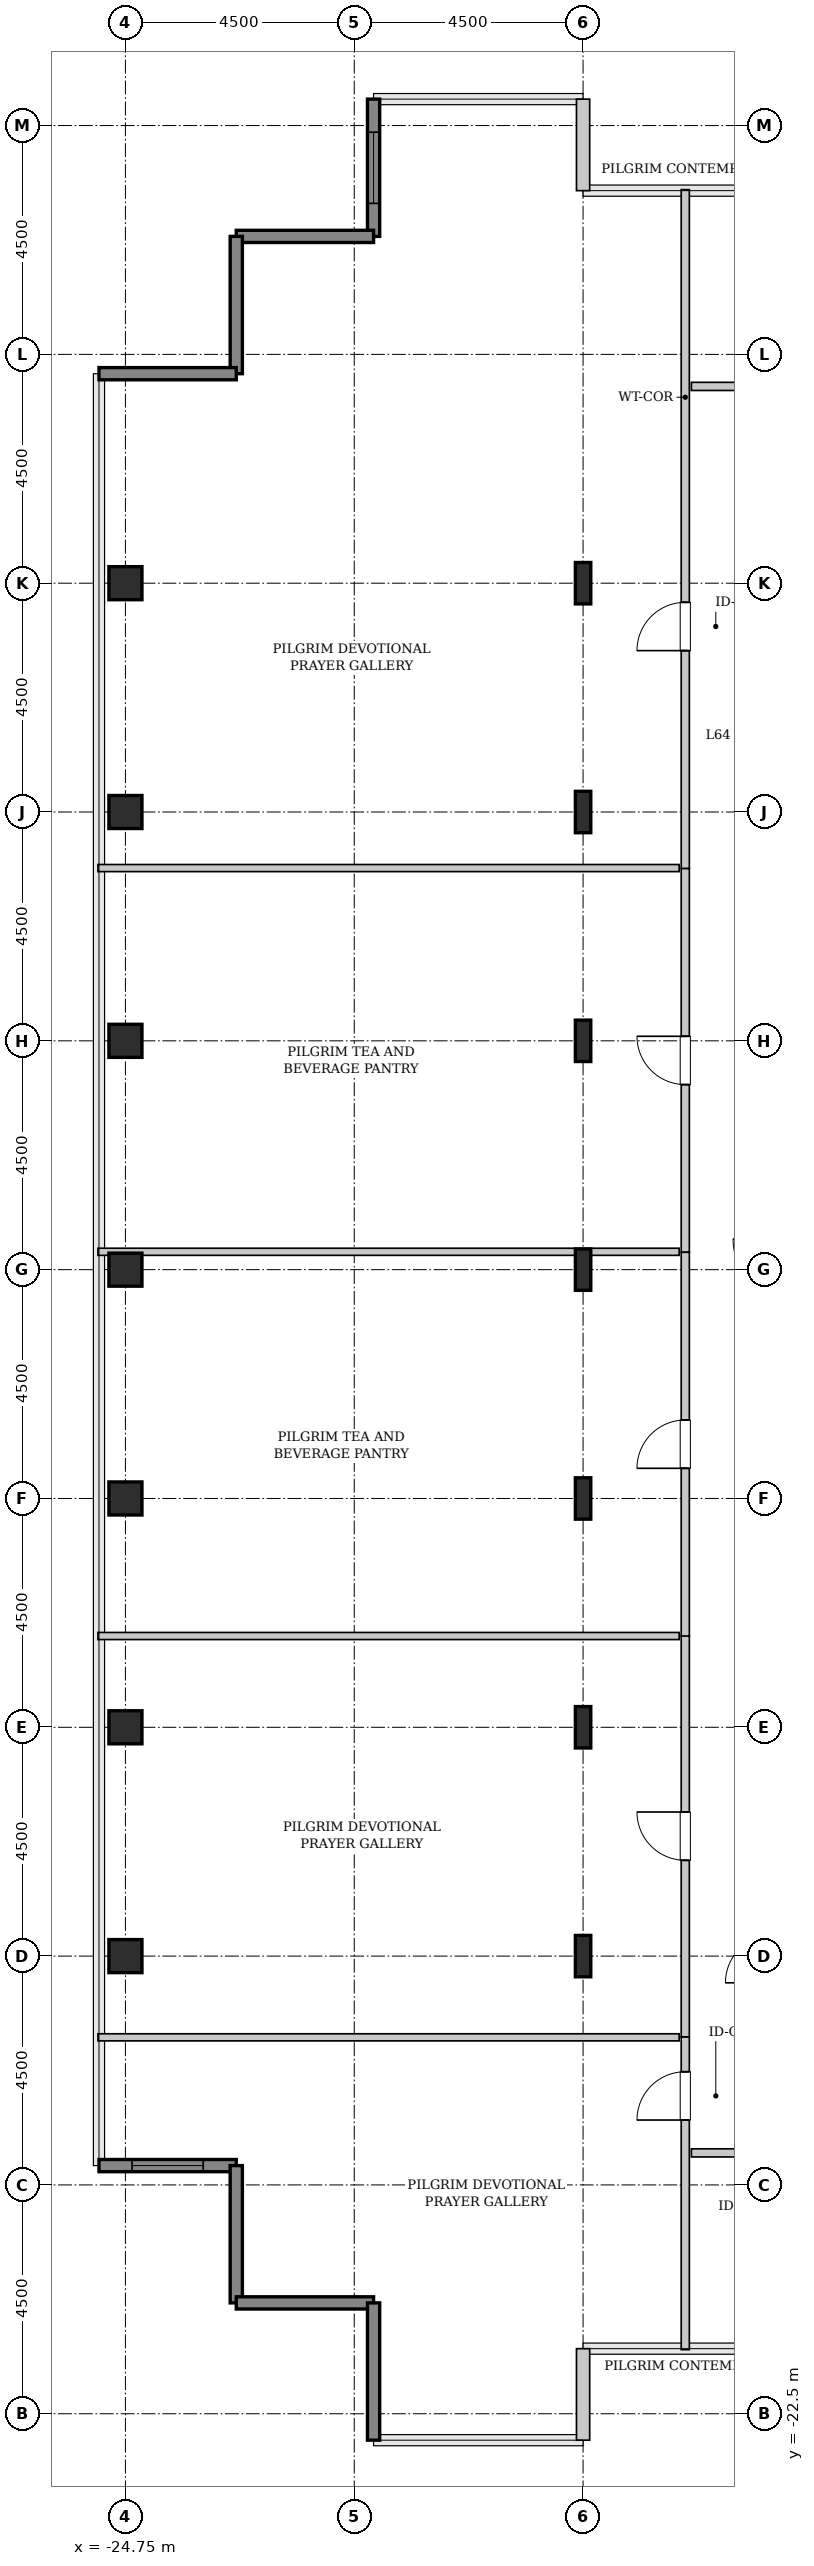
"""IFC4 building model, lengths in metres.
Left out: names, types, materials, properties, quantities, classifications, styles, units other than length and angle.
Written with IfcOpenShell. Run it as: python <this file> out.ifc"""

import sys

from ifc_helpers import new_model, si_unit, direction, frame, frame_2d, origin, origin_2d, place, context, subcontext, project, spatial, rectangle, hollow_rectangle, i_section, extrude, source, transform, mapped, element, fill, save


model = new_model("IFC4")
c1 = context("Model", 3, precision=1e-05, world=origin(), true_north=direction((0.0, 1.0)))
c2 = subcontext(c1, "Body", "Model", "MODEL_VIEW")
j1 = project(units=[si_unit("LENGTHUNIT", "METRE"), si_unit("PLANEANGLEUNIT", "RADIAN")], contexts=[c1])
p1 = place(None, origin())
s1 = spatial("IfcSite", under=j1, at=p1, CompositionType="ELEMENT")
p2 = place(p1, origin())
s2 = spatial("IfcBuilding", under=s1, at=p2, CompositionType="ELEMENT")
p3 = place(p2, frame((0.0, 0.0, 256.0)))
s3 = spatial("IfcBuildingStorey", under=s2, at=p3, CompositionType="ELEMENT", Elevation=256.0)
m1 = source(origin(), c2, "Body", "SweptSolid", [
    extrude(hollow_rectangle(XDim=0.65, YDim=0.65, WallThickness=0.032, InnerFilletRadius=0.032, OuterFilletRadius=0.064, at=origin_2d()), origin(), (0.0, 0.0, 1.0), 3.8),
])
for number, where, z_axis, x_axis in (
    (1, (-24.75, -13.5, 0.0), (0.0, 0.0, 1.0), (1.0, 0.0, 0.0)),
    (2, (-24.75, -9.0, 0.0), (0.0, 0.0, 1.0), (1.0, 0.0, 0.0)),
    (3, (-24.75, -4.5, 0.0), (0.0, 0.0, 1.0), (1.0, 0.0, 0.0)),
    (4, (-24.75, 0.0, 0.0), (0.0, 0.0, 1.0), (1.0, 0.0, 0.0)),
    (5, (-24.75, 4.5, 0.0), (0.0, 0.0, 1.0), (1.0, 0.0, 0.0)),
    (6, (-24.75, 9.0, 0.0), (0.0, 0.0, 1.0), (1.0, 0.0, 0.0)),
    (7, (-24.75, 13.5, 0.0), (0.0, 0.0, 1.0), (1.0, 0.0, 0.0)),
):
    element("IfcColumn", number, at=place(p3, frame(where, z_axis=z_axis, x_axis=x_axis)), inside=s3, PredefinedType="COLUMN", context=c2, shape_type="MappedRepresentation", body=[
        mapped(m1, transform((0.0, 0.0, 0.0), x_axis=(1.0, 0.0, 0.0), y_axis=(0.0, 1.0, 0.0), z_axis=(0.0, 0.0, 1.0), scale=1.0)),
    ])
m2 = source(origin(), c2, "Body", "SweptSolid", [
    extrude(i_section(OverallWidth=0.303, OverallDepth=0.814, WebThickness=0.021, FlangeThickness=0.04, FilletRadius=0.03, at=origin_2d()), origin(), (0.0, 0.0, 1.0), 3.8),
])
for number, where, z_axis, x_axis in (
    (8, (-15.75, -13.5, 0.0), (0.0, 0.0, 1.0), (1.0, 0.0, 0.0)),
    (9, (-15.75, -9.0, 0.0), (0.0, 0.0, 1.0), (1.0, 0.0, 0.0)),
    (10, (-15.75, -4.5, 0.0), (0.0, 0.0, 1.0), (1.0, 0.0, 0.0)),
    (11, (-15.75, 0.0, 0.0), (0.0, 0.0, 1.0), (1.0, 0.0, 0.0)),
    (12, (-15.75, 4.5, 0.0), (0.0, 0.0, 1.0), (1.0, 0.0, 0.0)),
    (13, (-15.75, 9.0, 0.0), (0.0, 0.0, 1.0), (1.0, 0.0, 0.0)),
    (14, (-15.75, 13.5, 0.0), (0.0, 0.0, 1.0), (1.0, 0.0, 0.0)),
):
    element("IfcColumn", number, at=place(p3, frame(where, z_axis=z_axis, x_axis=x_axis)), inside=s3, PredefinedType="COLUMN", context=c2, shape_type="MappedRepresentation", body=[
        mapped(m2, transform((0.0, 0.0, 0.0), x_axis=(1.0, 0.0, 0.0), y_axis=(0.0, 1.0, 0.0), z_axis=(0.0, 0.0, 1.0), scale=1.0)),
    ])
m3 = source(origin(), c2, "Body", "SweptSolid", [
    extrude(rectangle(XDim=1.8, YDim=0.26, at=frame_2d((0.9, 0.0))), origin(), (0.0, 0.0, 1.0), 3.5),
])
p4 = place(p3, frame((-15.75, 21.22, 0.0), z_axis=(0.0, 0.0, 1.0), x_axis=(0.0, 1.0, 0.0)))
e15 = element("IfcWall", 15, at=p4, inside=s3, PredefinedType="SOLIDWALL", context=c2, shape_type="MappedRepresentation", body=[
    mapped(m3, transform((0.0, 0.0, 0.0), x_axis=(1.0, 0.0, 0.0), y_axis=(0.0, 1.0, 0.0), z_axis=(0.0, 0.0, 1.0), scale=1.0)),
])
m4 = source(origin(), c2, "Body", "SweptSolid", [
    extrude(rectangle(XDim=2.7, YDim=0.24, at=frame_2d((1.35, 0.0))), origin(), (0.0, 0.0, 1.0), 3.5),
])
p5 = place(p3, frame((-19.87, 23.02, 0.0), z_axis=(0.0, 0.0, 1.0), x_axis=(0.0, -1.0, 0.0)))
e16 = element("IfcWall", 16, at=p5, inside=s3, PredefinedType="SHEAR", context=c2, shape_type="MappedRepresentation", body=[
    mapped(m4, transform((0.0, 0.0, 0.0), x_axis=(1.0, 0.0, 0.0), y_axis=(0.0, 1.0, 0.0), z_axis=(0.0, 0.0, 1.0), scale=1.0)),
])
p6 = place(p5, frame((0.65, 0.0, 0.85)))
e17 = element("IfcOpeningElement", 17, at=p6, cuts=e16, PredefinedType="OPENING", context=c2, shape_type="SweptSolid", body=[
    extrude(rectangle(XDim=1.4, YDim=1.8, at=frame_2d((0.7, 0.9))), frame((0.0, 0.13, 0.0), z_axis=(0.0, -1.0, 0.0), x_axis=(1.0, 0.0, 0.0)), (0.0, 0.0, 1.0), 0.26),
])
for number, where, z_axis, x_axis in (
    (18, (-19.87, 20.32, 0.0), (0.0, 0.0, 1.0), (-1.0, 0.0, 0.0)),
    (19, (-22.57, 20.32, 0.0), (0.0, 0.0, 1.0), (0.0, -1.0, 0.0)),
    (20, (-22.57, 17.62, 0.0), (0.0, 0.0, 1.0), (-1.0, 0.0, 0.0)),
):
    element("IfcWall", number, at=place(p3, frame(where, z_axis=z_axis, x_axis=x_axis)), inside=s3, PredefinedType="SHEAR", context=c2, shape_type="MappedRepresentation", body=[
        mapped(m4, transform((0.0, 0.0, 0.0), x_axis=(1.0, 0.0, 0.0), y_axis=(0.0, 1.0, 0.0), z_axis=(0.0, 0.0, 1.0), scale=1.0)),
    ])
p7 = place(p3, frame((-25.27, -17.62, 0.0), z_axis=(0.0, 0.0, 1.0), x_axis=(1.0, 0.0, 0.0)))
e21 = element("IfcWall", 21, at=p7, inside=s3, PredefinedType="SHEAR", context=c2, shape_type="MappedRepresentation", body=[
    mapped(m4, transform((0.0, 0.0, 0.0), x_axis=(1.0, 0.0, 0.0), y_axis=(0.0, 1.0, 0.0), z_axis=(0.0, 0.0, 1.0), scale=1.0)),
])
p8 = place(p7, frame((0.65, 0.0, 0.85)))
e22 = element("IfcOpeningElement", 22, at=p8, cuts=e21, PredefinedType="OPENING", context=c2, shape_type="SweptSolid", body=[
    extrude(rectangle(XDim=1.4, YDim=1.8, at=frame_2d((0.7, 0.9))), frame((0.0, 0.13, 0.0), z_axis=(0.0, -1.0, 0.0), x_axis=(1.0, 0.0, 0.0)), (0.0, 0.0, 1.0), 0.26),
])
for number, where, z_axis, x_axis in (
    (23, (-22.57, -17.62, 0.0), (0.0, 0.0, 1.0), (0.0, -1.0, 0.0)),
    (24, (-22.57, -20.32, 0.0), (0.0, 0.0, 1.0), (1.0, 0.0, 0.0)),
    (25, (-19.87, -20.32, 0.0), (0.0, 0.0, 1.0), (0.0, -1.0, 0.0)),
):
    element("IfcWall", number, at=place(p3, frame(where, z_axis=z_axis, x_axis=x_axis)), inside=s3, PredefinedType="SHEAR", context=c2, shape_type="MappedRepresentation", body=[
        mapped(m4, transform((0.0, 0.0, 0.0), x_axis=(1.0, 0.0, 0.0), y_axis=(0.0, 1.0, 0.0), z_axis=(0.0, 0.0, 1.0), scale=1.0)),
    ])
p9 = place(p3, frame((-15.75, -23.02, 0.0), z_axis=(0.0, 0.0, 1.0), x_axis=(0.0, 1.0, 0.0)))
e26 = element("IfcWall", 26, at=p9, inside=s3, PredefinedType="SOLIDWALL", context=c2, shape_type="MappedRepresentation", body=[
    mapped(m3, transform((0.0, 0.0, 0.0), x_axis=(1.0, 0.0, 0.0), y_axis=(0.0, 1.0, 0.0), z_axis=(0.0, 0.0, 1.0), scale=1.0)),
])
m5 = source(origin(), c2, "Body", "SweptSolid", [
    extrude(rectangle(XDim=6.153, YDim=0.16, at=frame_2d((3.076, 0.0))), origin(), (0.0, 0.0, 1.0), 3.485),
])
p10 = place(p3, frame((-13.74, -21.24, 0.0), z_axis=(0.0, 0.0, 1.0), x_axis=(0.0, 1.0, 0.0)))
e27 = element("IfcWall", 27, at=p10, inside=s3, PredefinedType="PARTITIONING", context=c2, shape_type="MappedRepresentation", body=[
    mapped(m5, transform((0.0, 0.0, 0.0), x_axis=(1.0, 0.0, 0.0), y_axis=(0.0, 1.0, 0.0), z_axis=(0.0, 0.0, 1.0), scale=1.0)),
])
p11 = place(p10, frame((4.516, 0.0, 0.0)))
e28 = element("IfcOpeningElement", 28, at=p11, cuts=e27, PredefinedType="OPENING", context=c2, shape_type="SweptSolid", body=[
    extrude(rectangle(XDim=0.95, YDim=2.1, at=frame_2d((0.475, 1.05))), frame((0.0, 0.09, 0.0), z_axis=(0.0, -1.0, 0.0), x_axis=(1.0, 0.0, 0.0)), (0.0, 0.0, 1.0), 0.18),
])
m6 = source(origin(), c2, "Body", "SweptSolid", [
    extrude(rectangle(XDim=11.43, YDim=0.14, at=frame_2d((5.715, 0.0))), origin(), (0.0, 0.0, 1.0), 3.485),
])
p12 = place(p3, frame((-25.29, -15.097, 0.0), z_axis=(0.0, 0.0, 1.0), x_axis=(1.0, 0.0, 0.0)))
e29 = element("IfcWall", 29, at=p12, inside=s3, PredefinedType="PARTITIONING", context=c2, shape_type="MappedRepresentation", body=[
    mapped(m6, transform((0.0, 0.0, 0.0), x_axis=(1.0, 0.0, 0.0), y_axis=(0.0, 1.0, 0.0), z_axis=(0.0, 0.0, 1.0), scale=1.0)),
])
m7 = source(origin(), c2, "Body", "SweptSolid", [
    extrude(rectangle(XDim=7.892, YDim=0.16, at=frame_2d((3.946, 0.0))), origin(), (0.0, 0.0, 1.0), 3.485),
])
p13 = place(p3, frame((-13.74, -15.087, 0.0), z_axis=(0.0, 0.0, 1.0), x_axis=(0.0, 1.0, 0.0)))
e30 = element("IfcWall", 30, at=p13, inside=s3, PredefinedType="PARTITIONING", context=c2, shape_type="MappedRepresentation", body=[
    mapped(m7, transform((0.0, 0.0, 0.0), x_axis=(1.0, 0.0, 0.0), y_axis=(0.0, 1.0, 0.0), z_axis=(0.0, 0.0, 1.0), scale=1.0)),
])
p14 = place(p13, frame((3.471, 0.0, 0.0)))
e31 = element("IfcOpeningElement", 31, at=p14, cuts=e30, PredefinedType="OPENING", context=c2, shape_type="SweptSolid", body=[
    extrude(rectangle(XDim=0.95, YDim=2.1, at=frame_2d((0.475, 1.05))), frame((0.0, 0.09, 0.0), z_axis=(0.0, -1.0, 0.0), x_axis=(1.0, 0.0, 0.0)), (0.0, 0.0, 1.0), 0.18),
])
p15 = place(p3, frame((-25.29, -7.205, 0.0), z_axis=(0.0, 0.0, 1.0), x_axis=(1.0, 0.0, 0.0)))
e32 = element("IfcWall", 32, at=p15, inside=s3, PredefinedType="PARTITIONING", context=c2, shape_type="MappedRepresentation", body=[
    mapped(m6, transform((0.0, 0.0, 0.0), x_axis=(1.0, 0.0, 0.0), y_axis=(0.0, 1.0, 0.0), z_axis=(0.0, 0.0, 1.0), scale=1.0)),
])
m8 = source(origin(), c2, "Body", "SweptSolid", [
    extrude(rectangle(XDim=13.353, YDim=0.16, at=frame_2d((6.676, 0.0))), origin(), (0.0, 0.0, 1.0), 3.485),
])
p16 = place(p3, frame((-13.74, 7.887, 0.0), z_axis=(0.0, 0.0, 1.0), x_axis=(0.0, 1.0, 0.0)))
e33 = element("IfcWall", 33, at=p16, inside=s3, PredefinedType="PARTITIONING", context=c2, shape_type="MappedRepresentation", body=[
    mapped(m8, transform((0.0, 0.0, 0.0), x_axis=(1.0, 0.0, 0.0), y_axis=(0.0, 1.0, 0.0), z_axis=(0.0, 0.0, 1.0), scale=1.0)),
])
p17 = place(p16, frame((4.286, 0.0, 0.0)))
e34 = element("IfcOpeningElement", 34, at=p17, cuts=e33, PredefinedType="OPENING", context=c2, shape_type="SweptSolid", body=[
    extrude(rectangle(XDim=0.95, YDim=2.1, at=frame_2d((0.475, 1.05))), frame((0.0, 0.09, 0.0), z_axis=(0.0, -1.0, 0.0), x_axis=(1.0, 0.0, 0.0)), (0.0, 0.0, 1.0), 0.18),
])
p18 = place(p3, frame((-25.29, 7.897, 0.0), z_axis=(0.0, 0.0, 1.0), x_axis=(1.0, 0.0, 0.0)))
e35 = element("IfcWall", 35, at=p18, inside=s3, PredefinedType="PARTITIONING", context=c2, shape_type="MappedRepresentation", body=[
    mapped(m6, transform((0.0, 0.0, 0.0), x_axis=(1.0, 0.0, 0.0), y_axis=(0.0, 1.0, 0.0), z_axis=(0.0, 0.0, 1.0), scale=1.0)),
])
m9 = source(origin(), c2, "Body", "SweptSolid", [
    extrude(rectangle(XDim=7.546, YDim=0.16, at=frame_2d((3.773, 0.0))), origin(), (0.0, 0.0, 1.0), 3.485),
])
p19 = place(p3, frame((-13.74, 0.341, 0.0), z_axis=(0.0, 0.0, 1.0), x_axis=(0.0, 1.0, 0.0)))
e36 = element("IfcWall", 36, at=p19, inside=s3, PredefinedType="PARTITIONING", context=c2, shape_type="MappedRepresentation", body=[
    mapped(m9, transform((0.0, 0.0, 0.0), x_axis=(1.0, 0.0, 0.0), y_axis=(0.0, 1.0, 0.0), z_axis=(0.0, 0.0, 1.0), scale=1.0)),
])
p20 = place(p19, frame((3.298, 0.0, 0.0)))
e37 = element("IfcOpeningElement", 37, at=p20, cuts=e36, PredefinedType="OPENING", context=c2, shape_type="SweptSolid", body=[
    extrude(rectangle(XDim=0.95, YDim=2.1, at=frame_2d((0.475, 1.05))), frame((0.0, 0.09, 0.0), z_axis=(0.0, -1.0, 0.0), x_axis=(1.0, 0.0, 0.0)), (0.0, 0.0, 1.0), 0.18),
])
m10 = source(origin(), c2, "Body", "SweptSolid", [
    extrude(rectangle(XDim=11.43, YDim=0.14, at=frame_2d((5.715, 0.0))), origin(), (0.0, 0.0, 1.0), 2.875),
])
p21 = place(p3, frame((-25.29, 0.351, 0.0), z_axis=(0.0, 0.0, 1.0), x_axis=(1.0, 0.0, 0.0)))
e38 = element("IfcWall", 38, at=p21, inside=s3, PredefinedType="PARTITIONING", context=c2, shape_type="MappedRepresentation", body=[
    mapped(m10, transform((0.0, 0.0, 0.0), x_axis=(1.0, 0.0, 0.0), y_axis=(0.0, 1.0, 0.0), z_axis=(0.0, 0.0, 1.0), scale=1.0)),
])
m11 = source(origin(), c2, "Body", "SweptSolid", [
    extrude(rectangle(XDim=7.546, YDim=0.16, at=frame_2d((3.773, 0.0))), origin(), (0.0, 0.0, 1.0), 3.485),
])
p22 = place(p3, frame((-13.74, -7.205, 0.0), z_axis=(0.0, 0.0, 1.0), x_axis=(0.0, 1.0, 0.0)))
e39 = element("IfcWall", 39, at=p22, inside=s3, PredefinedType="PARTITIONING", context=c2, shape_type="MappedRepresentation", body=[
    mapped(m11, transform((0.0, 0.0, 0.0), x_axis=(1.0, 0.0, 0.0), y_axis=(0.0, 1.0, 0.0), z_axis=(0.0, 0.0, 1.0), scale=1.0)),
])
p23 = place(p22, frame((3.298, 0.0, 0.0)))
e40 = element("IfcOpeningElement", 40, at=p23, cuts=e39, PredefinedType="OPENING", context=c2, shape_type="SweptSolid", body=[
    extrude(rectangle(XDim=0.95, YDim=2.1, at=frame_2d((0.475, 1.05))), frame((0.0, 0.09, 0.0), z_axis=(0.0, -1.0, 0.0), x_axis=(1.0, 0.0, 0.0)), (0.0, 0.0, 1.0), 0.18),
])
m12 = source(origin(), c2, "Body", "SweptSolid", [
    extrude(rectangle(XDim=4.16, YDim=0.16, at=frame_2d((2.08, 0.0))), origin(), (0.0, 0.0, 1.0), 3.485),
])
p24 = place(p3, frame((-13.62, 17.37, 0.0), z_axis=(0.0, 0.0, 1.0), x_axis=(1.0, 0.0, 0.0)))
e41 = element("IfcWall", 41, at=p24, inside=s3, PredefinedType="PARTITIONING", context=c2, shape_type="MappedRepresentation", body=[
    mapped(m12, transform((0.0, 0.0, 0.0), x_axis=(1.0, 0.0, 0.0), y_axis=(0.0, 1.0, 0.0), z_axis=(0.0, 0.0, 1.0), scale=1.0)),
])
p25 = place(p24, frame((0.969, 0.0, 0.0)))
e42 = element("IfcOpeningElement", 42, at=p25, cuts=e41, PredefinedType="OPENING", context=c2, shape_type="SweptSolid", body=[
    extrude(rectangle(XDim=0.95, YDim=2.1, at=frame_2d((0.475, 1.05))), frame((0.0, 0.09, 0.0), z_axis=(0.0, -1.0, 0.0), x_axis=(1.0, 0.0, 0.0)), (0.0, 0.0, 1.0), 0.18),
])
m13 = source(origin(), c2, "Body", "SweptSolid", [
    extrude(rectangle(XDim=3.625, YDim=0.16, at=frame_2d((1.812, 0.0))), origin(), (0.0, 0.0, 1.0), 3.485),
])
p26 = place(p3, frame((-13.62, -17.37, 0.0), z_axis=(0.0, 0.0, 1.0), x_axis=(1.0, 0.0, 0.0)))
e43 = element("IfcWall", 43, at=p26, inside=s3, PredefinedType="PARTITIONING", context=c2, shape_type="MappedRepresentation", body=[
    mapped(m13, transform((0.0, 0.0, 0.0), x_axis=(1.0, 0.0, 0.0), y_axis=(0.0, 1.0, 0.0), z_axis=(0.0, 0.0, 1.0), scale=1.0)),
])
p27 = place(p26, frame((0.999, 0.0, 0.0)))
e44 = element("IfcOpeningElement", 44, at=p27, cuts=e43, PredefinedType="OPENING", context=c2, shape_type="SweptSolid", body=[
    extrude(rectangle(XDim=0.95, YDim=2.1, at=frame_2d((0.475, 1.05))), frame((0.0, 0.09, 0.0), z_axis=(0.0, -1.0, 0.0), x_axis=(1.0, 0.0, 0.0)), (0.0, 0.0, 1.0), 0.18),
])
m14 = source(origin(), c2, "Body", "SweptSolid", [
    extrude(rectangle(XDim=1.4, YDim=1.8, at=frame_2d((0.7, 0.9))), frame((0.0, 0.03, 0.0), z_axis=(0.0, -1.0, 0.0), x_axis=(1.0, 0.0, 0.0)), (0.0, 0.0, 1.0), 0.06),
])
p28 = place(p6, origin())
e45 = element("IfcWindow", 45, at=p28, inside=s3, PartitioningType="SINGLE_PANEL", PredefinedType="WINDOW", context=c2, shape_type="MappedRepresentation", body=[
    mapped(m14, transform((0.0, 0.0, 0.0), x_axis=(1.0, 0.0, 0.0), y_axis=(0.0, 1.0, 0.0), z_axis=(0.0, 0.0, 1.0), scale=1.0)),
])
fill(e17, e45)
p29 = place(p8, origin())
e46 = element("IfcWindow", 46, at=p29, inside=s3, PartitioningType="SINGLE_PANEL", PredefinedType="WINDOW", context=c2, shape_type="MappedRepresentation", body=[
    mapped(m14, transform((0.0, 0.0, 0.0), x_axis=(1.0, 0.0, 0.0), y_axis=(0.0, 1.0, 0.0), z_axis=(0.0, 0.0, 1.0), scale=1.0)),
])
fill(e22, e46)
m15 = source(origin(), c2, "Body", "SweptSolid", [
    extrude(rectangle(XDim=0.95, YDim=2.1, at=frame_2d((0.475, 1.05))), frame((0.0, 0.025, 0.0), z_axis=(0.0, -1.0, 0.0), x_axis=(1.0, 0.0, 0.0)), (0.0, 0.0, 1.0), 0.05),
])
p30 = place(p11, origin())
e47 = element("IfcDoor", 47, at=p30, inside=s3, OperationType="SINGLE_SWING_LEFT", PredefinedType="DOOR", context=c2, shape_type="MappedRepresentation", body=[
    mapped(m15, transform((0.0, 0.0, 0.0), x_axis=(1.0, 0.0, 0.0), y_axis=(0.0, 1.0, 0.0), z_axis=(0.0, 0.0, 1.0), scale=1.0)),
])
fill(e28, e47)
p31 = place(p14, origin())
e48 = element("IfcDoor", 48, at=p31, inside=s3, OperationType="SINGLE_SWING_RIGHT", PredefinedType="DOOR", context=c2, shape_type="MappedRepresentation", body=[
    mapped(m15, transform((0.0, 0.0, 0.0), x_axis=(1.0, 0.0, 0.0), y_axis=(0.0, 1.0, 0.0), z_axis=(0.0, 0.0, 1.0), scale=1.0)),
])
fill(e31, e48)
p32 = place(p17, origin())
e49 = element("IfcDoor", 49, at=p32, inside=s3, OperationType="SINGLE_SWING_LEFT", PredefinedType="DOOR", context=c2, shape_type="MappedRepresentation", body=[
    mapped(m15, transform((0.0, 0.0, 0.0), x_axis=(1.0, 0.0, 0.0), y_axis=(0.0, 1.0, 0.0), z_axis=(0.0, 0.0, 1.0), scale=1.0)),
])
fill(e34, e49)
p33 = place(p20, origin())
e50 = element("IfcDoor", 50, at=p33, inside=s3, OperationType="SINGLE_SWING_RIGHT", PredefinedType="DOOR", context=c2, shape_type="MappedRepresentation", body=[
    mapped(m15, transform((0.0, 0.0, 0.0), x_axis=(1.0, 0.0, 0.0), y_axis=(0.0, 1.0, 0.0), z_axis=(0.0, 0.0, 1.0), scale=1.0)),
])
fill(e37, e50)
p34 = place(p23, origin())
e51 = element("IfcDoor", 51, at=p34, inside=s3, OperationType="SINGLE_SWING_LEFT", PredefinedType="DOOR", context=c2, shape_type="MappedRepresentation", body=[
    mapped(m15, transform((0.0, 0.0, 0.0), x_axis=(1.0, 0.0, 0.0), y_axis=(0.0, 1.0, 0.0), z_axis=(0.0, 0.0, 1.0), scale=1.0)),
])
fill(e40, e51)
save(model, sys.argv[1])
